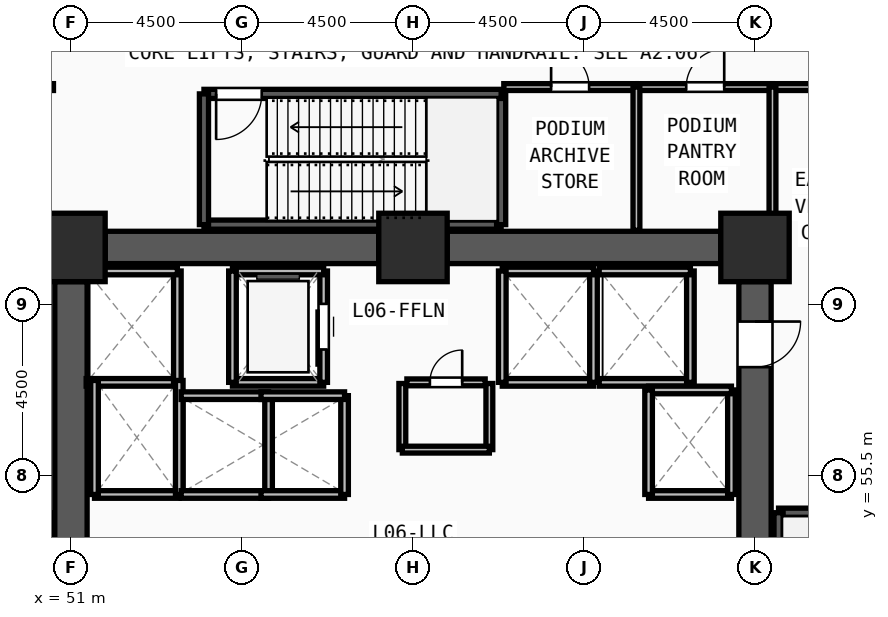
"""IFC4 building model, lengths in metres.
Left out: names, types, materials, properties, quantities, classifications, styles, units other than length and angle.
Written with IfcOpenShell. Run it as: python <this file> out.ifc"""

import sys

from ifc_helpers import new_model, si_unit, direction, frame, frame_2d, origin, origin_2d, place, context, subcontext, project, spatial, rectangle, extrude, source, transform, mapped, element, fill, save


model = new_model("IFC4")
c1 = context("Model", 3, precision=1e-05, world=origin(), true_north=direction((0.0, 1.0)))
c2 = subcontext(c1, "Body", "Model", "MODEL_VIEW")
j1 = project(units=[si_unit("LENGTHUNIT", "METRE"), si_unit("PLANEANGLEUNIT", "RADIAN")], contexts=[c1])
p1 = place(None, origin())
s1 = spatial("IfcSite", under=j1, at=p1, CompositionType="ELEMENT")
p2 = place(p1, origin())
s2 = spatial("IfcBuilding", under=s1, at=p2, CompositionType="ELEMENT")
p3 = place(p2, frame((0.0, 0.0, 23.4)))
s3 = spatial("IfcBuildingStorey", under=s2, at=p3, CompositionType="ELEMENT", Elevation=23.4)
m1 = source(origin(), c2, "Body", "SweptSolid", [
    extrude(rectangle(XDim=1.8, YDim=1.8, at=origin_2d()), origin(), (0.0, 0.0, 1.0), 5.1),
])
for number, where, z_axis, x_axis in (
    (1, (69.0, 61.5, 0.0), (0.0, 0.0, 1.0), (1.0, 0.0, 0.0)),
    (2, (60.0, 61.5, 0.0), (0.0, 0.0, 1.0), (1.0, 0.0, 0.0)),
    (3, (51.0, 61.5, 0.0), (0.0, 0.0, 1.0), (1.0, 0.0, 0.0)),
):
    element("IfcColumn", number, at=place(p3, frame(where, z_axis=z_axis, x_axis=x_axis)), inside=s3, PredefinedType="COLUMN", context=c2, shape_type="MappedRepresentation", body=[
        mapped(m1, transform((0.0, 0.0, 0.0), x_axis=(1.0, 0.0, 0.0), y_axis=(0.0, 1.0, 0.0), z_axis=(0.0, 0.0, 1.0), scale=1.0)),
    ])
for number, where, z_axis, x_axis in (
    (4, (51.9, 61.5, 0.0), (0.0, 0.0, 1.0), (1.0, 0.0, 0.0)),
    (5, (60.9, 61.5, 0.0), (0.0, 0.0, 1.0), (1.0, 0.0, 0.0)),
):
    element("IfcWall", number, at=place(p3, frame(where, z_axis=z_axis, x_axis=x_axis)), inside=s3, PredefinedType="SHEAR", context=c2, shape_type="SweptSolid", body=[
        extrude(rectangle(XDim=7.2, YDim=0.85, at=frame_2d((3.6, 0.0))), origin(), (0.0, 0.0, 1.0), 4.82),
    ])
p4 = place(p3, frame((69.0, 60.6, 0.0), z_axis=(0.0, 0.0, 1.0), x_axis=(0.0, -1.0, 0.0)))
e6 = element("IfcWall", 6, at=p4, inside=s3, PredefinedType="SHEAR", context=c2, shape_type="SweptSolid", body=[
    extrude(rectangle(XDim=13.2, YDim=0.85, at=frame_2d((6.6, 0.0))), origin(), (0.0, 0.0, 1.0), 4.82),
])
m2 = source(origin(), c2, "Body", "SweptSolid", [
    extrude(rectangle(XDim=1.2, YDim=2.2, at=frame_2d((0.6, 1.1))), frame((0.0, 0.435, 0.0), z_axis=(0.0, -1.0, 0.0), x_axis=(1.0, 0.0, 0.0)), (0.0, 0.0, 1.0), 0.87),
])
p5 = place(p4, frame((1.05, 0.0, 0.0)))
e7 = element("IfcOpeningElement", 7, at=p5, cuts=e6, PredefinedType="OPENING", context=c2, shape_type="MappedRepresentation", body=[
    mapped(m2, transform((0.0, 0.0, 0.0), x_axis=(1.0, 0.0, 0.0), y_axis=(0.0, 1.0, 0.0), z_axis=(0.0, 0.0, 1.0), scale=1.0)),
])
p6 = place(p3, frame((51.0, 47.4, 0.0), z_axis=(0.0, 0.0, 1.0), x_axis=(0.0, 1.0, 0.0)))
e8 = element("IfcWall", 8, at=p6, inside=s3, PredefinedType="SHEAR", context=c2, shape_type="SweptSolid", body=[
    extrude(rectangle(XDim=13.2, YDim=0.85, at=frame_2d((6.6, 0.0))), origin(), (0.0, 0.0, 1.0), 4.82),
])
p7 = place(p3, frame((73.06, 54.52, 0.0), z_axis=(0.0, 0.0, 1.0), x_axis=(-1.0, 0.0, 0.0)))
e9 = element("IfcWall", 9, at=p7, inside=s3, PredefinedType="SOLIDWALL", context=c2, shape_type="SweptSolid", body=[
    extrude(rectangle(XDim=3.44, YDim=0.24, at=frame_2d((1.72, 0.0))), origin(), (0.0, 0.0, 1.0), 4.82),
])
for number, where, z_axis, x_axis in (
    (10, (69.62, 54.52, 0.0), (0.0, 0.0, 1.0), (0.0, -1.0, 0.0)),
    (11, (54.5, 62.1, 0.0), (0.0, 0.0, 1.0), (1.0, 0.0, 0.0)),
):
    element("IfcWall", number, at=place(p3, frame(where, z_axis=z_axis, x_axis=x_axis)), inside=s3, PredefinedType="SOLIDWALL", context=c2, shape_type="SweptSolid", body=[
        extrude(rectangle(XDim=7.82, YDim=0.24, at=frame_2d((3.91, 0.0))), origin(), (0.0, 0.0, 1.0), 4.82),
    ])
p8 = place(p3, frame((62.32, 62.1, 0.0), z_axis=(0.0, 0.0, 1.0), x_axis=(0.0, 1.0, 0.0)))
e12 = element("IfcWall", 12, at=p8, inside=s3, PredefinedType="SOLIDWALL", context=c2, shape_type="SweptSolid", body=[
    extrude(rectangle(XDim=3.44, YDim=0.24, at=frame_2d((1.72, 0.0))), origin(), (0.0, 0.0, 1.0), 4.82),
])
p9 = place(p3, frame((62.32, 65.54, 0.0), z_axis=(0.0, 0.0, 1.0), x_axis=(-1.0, 0.0, 0.0)))
e13 = element("IfcWall", 13, at=p9, inside=s3, PredefinedType="SOLIDWALL", context=c2, shape_type="SweptSolid", body=[
    extrude(rectangle(XDim=7.82, YDim=0.24, at=frame_2d((3.91, 0.0))), origin(), (0.0, 0.0, 1.0), 4.82),
])
m3 = source(origin(), c2, "Body", "SweptSolid", [
    extrude(rectangle(XDim=1.2, YDim=2.2, at=frame_2d((0.6, 1.1))), frame((0.0, 0.13, 0.0), z_axis=(0.0, -1.0, 0.0), x_axis=(1.0, 0.0, 0.0)), (0.0, 0.0, 1.0), 0.26),
])
p10 = place(p9, frame((6.3, 0.0, 0.0)))
e14 = element("IfcOpeningElement", 14, at=p10, cuts=e13, PredefinedType="OPENING", context=c2, shape_type="MappedRepresentation", body=[
    mapped(m3, transform((0.0, 0.0, 0.0), x_axis=(1.0, 0.0, 0.0), y_axis=(0.0, 1.0, 0.0), z_axis=(0.0, 0.0, 1.0), scale=1.0)),
])
p11 = place(p3, frame((54.5, 65.54, 0.0), z_axis=(0.0, 0.0, 1.0), x_axis=(0.0, -1.0, 0.0)))
e15 = element("IfcWall", 15, at=p11, inside=s3, PredefinedType="SOLIDWALL", context=c2, shape_type="SweptSolid", body=[
    extrude(rectangle(XDim=3.44, YDim=0.24, at=frame_2d((1.72, 0.0))), origin(), (0.0, 0.0, 1.0), 4.82),
])
p12 = place(p3, frame((55.25, 57.95, 0.0), z_axis=(0.0, 0.0, 1.0), x_axis=(1.0, 0.0, 0.0)))
e16 = element("IfcWall", 16, at=p12, inside=s3, PredefinedType="SOLIDWALL", context=c2, shape_type="SweptSolid", body=[
    extrude(rectangle(XDim=2.4, YDim=0.2, at=frame_2d((1.2, 0.0))), origin(), (0.0, 0.0, 1.0), 4.82),
])
p13 = place(p3, frame((57.65, 57.95, 0.0), z_axis=(0.0, 0.0, 1.0), x_axis=(0.0, 1.0, 0.0)))
e17 = element("IfcWall", 17, at=p13, inside=s3, PredefinedType="SOLIDWALL", context=c2, shape_type="SweptSolid", body=[
    extrude(rectangle(XDim=2.93, YDim=0.2, at=frame_2d((1.465, 0.0))), origin(), (0.0, 0.0, 1.0), 4.82),
])
m4 = source(origin(), c2, "Body", "SweptSolid", [
    extrude(rectangle(XDim=1.2, YDim=2.3, at=frame_2d((0.6, 1.15))), frame((0.0, 0.11, 0.0), z_axis=(0.0, -1.0, 0.0), x_axis=(1.0, 0.0, 0.0)), (0.0, 0.0, 1.0), 0.22),
])
p14 = place(p13, frame((0.865, 0.0, 0.0)))
e18 = element("IfcOpeningElement", 18, at=p14, cuts=e17, PredefinedType="OPENING", context=c2, shape_type="MappedRepresentation", body=[
    mapped(m4, transform((0.0, 0.0, 0.0), x_axis=(1.0, 0.0, 0.0), y_axis=(0.0, 1.0, 0.0), z_axis=(0.0, 0.0, 1.0), scale=1.0)),
])
p15 = place(p3, frame((57.65, 60.88, 0.0), z_axis=(0.0, 0.0, 1.0), x_axis=(-1.0, 0.0, 0.0)))
e19 = element("IfcWall", 19, at=p15, inside=s3, PredefinedType="SOLIDWALL", context=c2, shape_type="SweptSolid", body=[
    extrude(rectangle(XDim=2.4, YDim=0.2, at=frame_2d((1.2, 0.0))), origin(), (0.0, 0.0, 1.0), 4.82),
])
p16 = place(p3, frame((55.25, 60.88, 0.0), z_axis=(0.0, 0.0, 1.0), x_axis=(0.0, -1.0, 0.0)))
e20 = element("IfcWall", 20, at=p16, inside=s3, PredefinedType="SOLIDWALL", context=c2, shape_type="SweptSolid", body=[
    extrude(rectangle(XDim=2.93, YDim=0.2, at=frame_2d((1.465, 0.0))), origin(), (0.0, 0.0, 1.0), 4.82),
])
p17 = place(p3, frame((62.35, 57.95, 0.0), z_axis=(0.0, 0.0, 1.0), x_axis=(1.0, 0.0, 0.0)))
e21 = element("IfcWall", 21, at=p17, inside=s3, PredefinedType="SOLIDWALL", context=c2, shape_type="SweptSolid", body=[
    extrude(rectangle(XDim=2.4, YDim=0.2, at=frame_2d((1.2, 0.0))), origin(), (0.0, 0.0, 1.0), 4.82),
])
p18 = place(p3, frame((64.75, 57.95, 0.0), z_axis=(0.0, 0.0, 1.0), x_axis=(0.0, 1.0, 0.0)))
e22 = element("IfcWall", 22, at=p18, inside=s3, PredefinedType="SOLIDWALL", context=c2, shape_type="SweptSolid", body=[
    extrude(rectangle(XDim=2.93, YDim=0.2, at=frame_2d((1.465, 0.0))), origin(), (0.0, 0.0, 1.0), 4.82),
])
p19 = place(p3, frame((64.75, 60.88, 0.0), z_axis=(0.0, 0.0, 1.0), x_axis=(-1.0, 0.0, 0.0)))
e23 = element("IfcWall", 23, at=p19, inside=s3, PredefinedType="SOLIDWALL", context=c2, shape_type="SweptSolid", body=[
    extrude(rectangle(XDim=2.4, YDim=0.2, at=frame_2d((1.2, 0.0))), origin(), (0.0, 0.0, 1.0), 4.82),
])
p20 = place(p3, frame((62.35, 60.88, 0.0), z_axis=(0.0, 0.0, 1.0), x_axis=(0.0, -1.0, 0.0)))
e24 = element("IfcWall", 24, at=p20, inside=s3, PredefinedType="SOLIDWALL", context=c2, shape_type="SweptSolid", body=[
    extrude(rectangle(XDim=2.93, YDim=0.2, at=frame_2d((1.465, 0.0))), origin(), (0.0, 0.0, 1.0), 4.82),
])
p21 = place(p3, frame((64.9, 57.95, 0.0), z_axis=(0.0, 0.0, 1.0), x_axis=(1.0, 0.0, 0.0)))
e25 = element("IfcWall", 25, at=p21, inside=s3, PredefinedType="SOLIDWALL", context=c2, shape_type="SweptSolid", body=[
    extrude(rectangle(XDim=2.4, YDim=0.2, at=frame_2d((1.2, 0.0))), origin(), (0.0, 0.0, 1.0), 4.82),
])
p22 = place(p3, frame((67.3, 57.95, 0.0), z_axis=(0.0, 0.0, 1.0), x_axis=(0.0, 1.0, 0.0)))
e26 = element("IfcWall", 26, at=p22, inside=s3, PredefinedType="SOLIDWALL", context=c2, shape_type="SweptSolid", body=[
    extrude(rectangle(XDim=2.93, YDim=0.2, at=frame_2d((1.465, 0.0))), origin(), (0.0, 0.0, 1.0), 4.82),
])
for number, where, z_axis, x_axis in (
    (27, (67.3, 60.88, 0.0), (0.0, 0.0, 1.0), (-1.0, 0.0, 0.0)),
    (28, (51.4, 57.95, 0.0), (0.0, 0.0, 1.0), (1.0, 0.0, 0.0)),
):
    element("IfcWall", number, at=place(p3, frame(where, z_axis=z_axis, x_axis=x_axis)), inside=s3, PredefinedType="SOLIDWALL", context=c2, shape_type="SweptSolid", body=[
        extrude(rectangle(XDim=2.4, YDim=0.2, at=frame_2d((1.2, 0.0))), origin(), (0.0, 0.0, 1.0), 4.82),
    ])
p23 = place(p3, frame((53.8, 57.95, 0.0), z_axis=(0.0, 0.0, 1.0), x_axis=(0.0, 1.0, 0.0)))
e29 = element("IfcWall", 29, at=p23, inside=s3, PredefinedType="SOLIDWALL", context=c2, shape_type="SweptSolid", body=[
    extrude(rectangle(XDim=2.93, YDim=0.2, at=frame_2d((1.465, 0.0))), origin(), (0.0, 0.0, 1.0), 4.82),
])
p24 = place(p3, frame((53.8, 60.88, 0.0), z_axis=(0.0, 0.0, 1.0), x_axis=(-1.0, 0.0, 0.0)))
e30 = element("IfcWall", 30, at=p24, inside=s3, PredefinedType="SOLIDWALL", context=c2, shape_type="SweptSolid", body=[
    extrude(rectangle(XDim=2.4, YDim=0.2, at=frame_2d((1.2, 0.0))), origin(), (0.0, 0.0, 1.0), 4.82),
])
p25 = place(p3, frame((51.62, 55.0, 0.0), z_axis=(0.0, 0.0, 1.0), x_axis=(1.0, 0.0, 0.0)))
e31 = element("IfcWall", 31, at=p25, inside=s3, PredefinedType="SOLIDWALL", context=c2, shape_type="SweptSolid", body=[
    extrude(rectangle(XDim=2.23, YDim=0.2, at=frame_2d((1.115, 0.0))), origin(), (0.0, 0.0, 1.0), 4.82),
])
for number, where, z_axis, x_axis in (
    (32, (53.85, 55.0, 0.0), (0.0, 0.0, 1.0), (0.0, 1.0, 0.0)),
    (33, (51.62, 58.0, 0.0), (0.0, 0.0, 1.0), (0.0, -1.0, 0.0)),
):
    element("IfcWall", number, at=place(p3, frame(where, z_axis=z_axis, x_axis=x_axis)), inside=s3, PredefinedType="SOLIDWALL", context=c2, shape_type="SweptSolid", body=[
        extrude(rectangle(XDim=3.0, YDim=0.2, at=frame_2d((1.5, 0.0))), origin(), (0.0, 0.0, 1.0), 4.82),
    ])
p26 = place(p3, frame((66.2, 55.0, 0.0), z_axis=(0.0, 0.0, 1.0), x_axis=(1.0, 0.0, 0.0)))
e34 = element("IfcWall", 34, at=p26, inside=s3, PredefinedType="SOLIDWALL", context=c2, shape_type="SweptSolid", body=[
    extrude(rectangle(XDim=2.18, YDim=0.2, at=frame_2d((1.09, 0.0))), origin(), (0.0, 0.0, 1.0), 4.82),
])
p27 = place(p3, frame((68.38, 55.0, 0.0), z_axis=(0.0, 0.0, 1.0), x_axis=(0.0, 1.0, 0.0)))
e35 = element("IfcWall", 35, at=p27, inside=s3, PredefinedType="SOLIDWALL", context=c2, shape_type="SweptSolid", body=[
    extrude(rectangle(XDim=2.75, YDim=0.2, at=frame_2d((1.375, 0.0))), origin(), (0.0, 0.0, 1.0), 4.82),
])
p28 = place(p3, frame((68.38, 57.75, 0.0), z_axis=(0.0, 0.0, 1.0), x_axis=(-1.0, 0.0, 0.0)))
e36 = element("IfcWall", 36, at=p28, inside=s3, PredefinedType="SOLIDWALL", context=c2, shape_type="SweptSolid", body=[
    extrude(rectangle(XDim=2.18, YDim=0.2, at=frame_2d((1.09, 0.0))), origin(), (0.0, 0.0, 1.0), 4.82),
])
p29 = place(p3, frame((66.2, 57.75, 0.0), z_axis=(0.0, 0.0, 1.0), x_axis=(0.0, -1.0, 0.0)))
e37 = element("IfcWall", 37, at=p29, inside=s3, PredefinedType="SOLIDWALL", context=c2, shape_type="SweptSolid", body=[
    extrude(rectangle(XDim=2.75, YDim=0.2, at=frame_2d((1.375, 0.0))), origin(), (0.0, 0.0, 1.0), 4.82),
])
p30 = place(p3, frame((53.9, 55.0, 0.0), z_axis=(0.0, 0.0, 1.0), x_axis=(1.0, 0.0, 0.0)))
e38 = element("IfcWall", 38, at=p30, inside=s3, PredefinedType="SOLIDWALL", context=c2, shape_type="SweptSolid", body=[
    extrude(rectangle(XDim=2.3, YDim=0.2, at=frame_2d((1.15, 0.0))), origin(), (0.0, 0.0, 1.0), 4.82),
])
p31 = place(p3, frame((56.2, 55.0, 0.0), z_axis=(0.0, 0.0, 1.0), x_axis=(0.0, 1.0, 0.0)))
e39 = element("IfcWall", 39, at=p31, inside=s3, PredefinedType="SOLIDWALL", context=c2, shape_type="SweptSolid", body=[
    extrude(rectangle(XDim=2.6, YDim=0.2, at=frame_2d((1.3, 0.0))), origin(), (0.0, 0.0, 1.0), 4.82),
])
p32 = place(p3, frame((56.2, 57.6, 0.0), z_axis=(0.0, 0.0, 1.0), x_axis=(-1.0, 0.0, 0.0)))
e40 = element("IfcWall", 40, at=p32, inside=s3, PredefinedType="SOLIDWALL", context=c2, shape_type="SweptSolid", body=[
    extrude(rectangle(XDim=2.3, YDim=0.2, at=frame_2d((1.15, 0.0))), origin(), (0.0, 0.0, 1.0), 4.82),
])
p33 = place(p3, frame((56.0, 55.0, 0.0), z_axis=(0.0, 0.0, 1.0), x_axis=(1.0, 0.0, 0.0)))
e41 = element("IfcWall", 41, at=p33, inside=s3, PredefinedType="SOLIDWALL", context=c2, shape_type="SweptSolid", body=[
    extrude(rectangle(XDim=2.2, YDim=0.2, at=frame_2d((1.1, 0.0))), origin(), (0.0, 0.0, 1.0), 4.82),
])
p34 = place(p3, frame((58.2, 55.0, 0.0), z_axis=(0.0, 0.0, 1.0), x_axis=(0.0, 1.0, 0.0)))
e42 = element("IfcWall", 42, at=p34, inside=s3, PredefinedType="SOLIDWALL", context=c2, shape_type="SweptSolid", body=[
    extrude(rectangle(XDim=2.6, YDim=0.2, at=frame_2d((1.3, 0.0))), origin(), (0.0, 0.0, 1.0), 4.82),
])
p35 = place(p3, frame((58.2, 57.6, 0.0), z_axis=(0.0, 0.0, 1.0), x_axis=(-1.0, 0.0, 0.0)))
e43 = element("IfcWall", 43, at=p35, inside=s3, PredefinedType="SOLIDWALL", context=c2, shape_type="SweptSolid", body=[
    extrude(rectangle(XDim=2.2, YDim=0.2, at=frame_2d((1.1, 0.0))), origin(), (0.0, 0.0, 1.0), 4.82),
])
p36 = place(p3, frame((59.84, 57.95, 0.0), z_axis=(0.0, 0.0, 1.0), x_axis=(1.0, 0.0, 0.0)))
e44 = element("IfcWall", 44, at=p36, inside=s3, PredefinedType="PARTITIONING", context=c2, shape_type="SweptSolid", body=[
    extrude(rectangle(XDim=2.06, YDim=0.18, at=frame_2d((1.03, 0.0))), origin(), (0.0, 0.0, 1.0), 4.82),
])
m5 = source(origin(), c2, "Body", "SweptSolid", [
    extrude(rectangle(XDim=0.85, YDim=2.1, at=frame_2d((0.425, 1.05))), frame((0.0, 0.1, 0.0), z_axis=(0.0, -1.0, 0.0), x_axis=(1.0, 0.0, 0.0)), (0.0, 0.0, 1.0), 0.2),
])
p37 = place(p36, frame((0.605, 0.0, 0.0)))
e45 = element("IfcOpeningElement", 45, at=p37, cuts=e44, PredefinedType="OPENING", context=c2, shape_type="MappedRepresentation", body=[
    mapped(m5, transform((0.0, 0.0, 0.0), x_axis=(1.0, 0.0, 0.0), y_axis=(0.0, 1.0, 0.0), z_axis=(0.0, 0.0, 1.0), scale=1.0)),
])
p38 = place(p3, frame((62.39, 65.72, 0.0), z_axis=(0.0, 0.0, 1.0), x_axis=(1.0, 0.0, 0.0)))
e46 = element("IfcWall", 46, at=p38, inside=s3, PredefinedType="PARTITIONING", context=c2, shape_type="SweptSolid", body=[
    extrude(rectangle(XDim=3.49, YDim=0.18, at=frame_2d((1.745, 0.0))), origin(), (0.0, 0.0, 1.0), 4.82),
])
m6 = source(origin(), c2, "Body", "SweptSolid", [
    extrude(rectangle(XDim=1.0, YDim=2.2, at=frame_2d((0.5, 1.1))), frame((0.0, 0.1, 0.0), z_axis=(0.0, -1.0, 0.0), x_axis=(1.0, 0.0, 0.0)), (0.0, 0.0, 1.0), 0.2),
])
p39 = place(p38, frame((1.245, 0.0, 0.0)))
e47 = element("IfcOpeningElement", 47, at=p39, cuts=e46, PredefinedType="OPENING", context=c2, shape_type="MappedRepresentation", body=[
    mapped(m6, transform((0.0, 0.0, 0.0), x_axis=(1.0, 0.0, 0.0), y_axis=(0.0, 1.0, 0.0), z_axis=(0.0, 0.0, 1.0), scale=1.0)),
])
p40 = place(p3, frame((65.92, 65.72, 0.0), z_axis=(0.0, 0.0, 1.0), x_axis=(1.0, 0.0, 0.0)))
e48 = element("IfcWall", 48, at=p40, inside=s3, PredefinedType="PARTITIONING", context=c2, shape_type="SweptSolid", body=[
    extrude(rectangle(XDim=3.54, YDim=0.18, at=frame_2d((1.77, 0.0))), origin(), (0.0, 0.0, 1.0), 4.82),
])
p41 = place(p40, frame((1.27, 0.0, 0.0)))
e49 = element("IfcOpeningElement", 49, at=p41, cuts=e48, PredefinedType="OPENING", context=c2, shape_type="MappedRepresentation", body=[
    mapped(m6, transform((0.0, 0.0, 0.0), x_axis=(1.0, 0.0, 0.0), y_axis=(0.0, 1.0, 0.0), z_axis=(0.0, 0.0, 1.0), scale=1.0)),
])
p42 = place(p3, frame((46.7, 65.72, 0.0), z_axis=(0.0, 0.0, 1.0), x_axis=(1.0, 0.0, 0.0)))
e50 = element("IfcWall", 50, at=p42, inside=s3, PredefinedType="PARTITIONING", context=c2, shape_type="SweptSolid", body=[
    extrude(rectangle(XDim=3.84, YDim=0.18, at=frame_2d((1.92, 0.0))), origin(), (0.0, 0.0, 1.0), 4.82),
])
m7 = source(origin(), c2, "Body", "SweptSolid", [
    extrude(rectangle(XDim=1.3, YDim=2.2, at=frame_2d((0.65, 1.1))), frame((0.0, 0.1, 0.0), z_axis=(0.0, -1.0, 0.0), x_axis=(1.0, 0.0, 0.0)), (0.0, 0.0, 1.0), 0.2),
])
p43 = place(p42, frame((1.27, 0.0, 0.0)))
e51 = element("IfcOpeningElement", 51, at=p43, cuts=e50, PredefinedType="OPENING", context=c2, shape_type="MappedRepresentation", body=[
    mapped(m7, transform((0.0, 0.0, 0.0), x_axis=(1.0, 0.0, 0.0), y_axis=(0.0, 1.0, 0.0), z_axis=(0.0, 0.0, 1.0), scale=1.0)),
])
p44 = place(p3, frame((69.46, 65.72, 0.0), z_axis=(0.0, 0.0, 1.0), x_axis=(1.0, 0.0, 0.0)))
e52 = element("IfcWall", 52, at=p44, inside=s3, PredefinedType="PARTITIONING", context=c2, shape_type="SweptSolid", body=[
    extrude(rectangle(XDim=3.84, YDim=0.18, at=frame_2d((1.92, 0.0))), origin(), (0.0, 0.0, 1.0), 4.82),
])
p45 = place(p44, frame((1.27, 0.0, 0.0)))
e53 = element("IfcOpeningElement", 53, at=p45, cuts=e52, PredefinedType="OPENING", context=c2, shape_type="MappedRepresentation", body=[
    mapped(m7, transform((0.0, 0.0, 0.0), x_axis=(1.0, 0.0, 0.0), y_axis=(0.0, 1.0, 0.0), z_axis=(0.0, 0.0, 1.0), scale=1.0)),
])
for number, where, z_axis, x_axis in (
    (54, (59.72, 56.18, 0.0), (0.0, 0.0, 1.0), (0.0, 1.0, 0.0)),
    (55, (62.01, 56.18, 0.0), (0.0, 0.0, 1.0), (0.0, 1.0, 0.0)),
):
    element("IfcWall", number, at=place(p3, frame(where, z_axis=z_axis, x_axis=x_axis)), inside=s3, PredefinedType="PARTITIONING", context=c2, shape_type="SweptSolid", body=[
        extrude(rectangle(XDim=1.74, YDim=0.18, at=frame_2d((0.87, 0.0))), origin(), (0.0, 0.0, 1.0), 4.82),
    ])
p46 = place(p3, frame((59.72, 56.18, 0.0), z_axis=(0.0, 0.0, 1.0), x_axis=(1.0, 0.0, 0.0)))
e56 = element("IfcWall", 56, at=p46, inside=s3, PredefinedType="PARTITIONING", context=c2, shape_type="SweptSolid", body=[
    extrude(rectangle(XDim=2.29, YDim=0.18, at=frame_2d((1.145, 0.0))), origin(), (0.0, 0.0, 1.0), 4.82),
])
p47 = place(p3, frame((65.88, 61.95, 0.0), z_axis=(0.0, 0.0, 1.0), x_axis=(0.0, 1.0, 0.0)))
e57 = element("IfcWall", 57, at=p47, inside=s3, PredefinedType="PARTITIONING", context=c2, shape_type="SweptSolid", body=[
    extrude(rectangle(XDim=3.77, YDim=0.18, at=frame_2d((1.885, 0.0))), origin(), (0.0, 0.0, 1.0), 4.82),
])
p48 = place(p3, frame((69.46, 61.95, 0.0), z_axis=(0.0, 0.0, 1.0), x_axis=(0.0, 1.0, 0.0)))
e58 = element("IfcWall", 58, at=p48, inside=s3, PredefinedType="PARTITIONING", context=c2, shape_type="SweptSolid", body=[
    extrude(rectangle(XDim=3.77, YDim=0.18, at=frame_2d((1.885, 0.0))), origin(), (0.0, 0.0, 1.0), 3.335),
])
m8 = source(origin(), c2, "Body", "SweptSolid", [
    extrude(rectangle(XDim=1.2, YDim=2.2, at=frame_2d((0.6, 1.1))), frame((0.0, 0.025, 0.0), z_axis=(0.0, -1.0, 0.0), x_axis=(1.0, 0.0, 0.0)), (0.0, 0.0, 1.0), 0.05),
])
p49 = place(p5, origin())
e59 = element("IfcDoor", 59, at=p49, inside=s3, OperationType="SINGLE_SWING_LEFT", PredefinedType="DOOR", context=c2, shape_type="MappedRepresentation", body=[
    mapped(m8, transform((0.0, 0.0, 0.0), x_axis=(1.0, 0.0, 0.0), y_axis=(0.0, 1.0, 0.0), z_axis=(0.0, 0.0, 1.0), scale=1.0)),
])
fill(e7, e59)
p50 = place(p10, origin())
e60 = element("IfcDoor", 60, at=p50, inside=s3, OperationType="SINGLE_SWING_RIGHT", PredefinedType="DOOR", context=c2, shape_type="MappedRepresentation", body=[
    mapped(m8, transform((0.0, 0.0, 0.0), x_axis=(1.0, 0.0, 0.0), y_axis=(0.0, 1.0, 0.0), z_axis=(0.0, 0.0, 1.0), scale=1.0)),
])
fill(e14, e60)
m9 = source(origin(), c2, "Body", "SweptSolid", [
    extrude(rectangle(XDim=1.2, YDim=2.3, at=frame_2d((0.6, 1.15))), frame((0.0, 0.025, 0.0), z_axis=(0.0, -1.0, 0.0), x_axis=(1.0, 0.0, 0.0)), (0.0, 0.0, 1.0), 0.05),
])
p51 = place(p14, origin())
e61 = element("IfcDoor", 61, at=p51, inside=s3, OperationType="SLIDING_TO_LEFT", PredefinedType="DOOR", context=c2, shape_type="MappedRepresentation", body=[
    mapped(m9, transform((0.0, 0.0, 0.0), x_axis=(1.0, 0.0, 0.0), y_axis=(0.0, 1.0, 0.0), z_axis=(0.0, 0.0, 1.0), scale=1.0)),
])
fill(e18, e61)
m10 = source(origin(), c2, "Body", "SweptSolid", [
    extrude(rectangle(XDim=0.85, YDim=2.1, at=frame_2d((0.425, 1.05))), frame((0.0, 0.025, 0.0), z_axis=(0.0, -1.0, 0.0), x_axis=(1.0, 0.0, 0.0)), (0.0, 0.0, 1.0), 0.05),
])
p52 = place(p37, origin())
e62 = element("IfcDoor", 62, at=p52, inside=s3, OperationType="SINGLE_SWING_RIGHT", PredefinedType="DOOR", context=c2, shape_type="MappedRepresentation", body=[
    mapped(m10, transform((0.0, 0.0, 0.0), x_axis=(1.0, 0.0, 0.0), y_axis=(0.0, 1.0, 0.0), z_axis=(0.0, 0.0, 1.0), scale=1.0)),
])
fill(e45, e62)
m11 = source(origin(), c2, "Body", "SweptSolid", [
    extrude(rectangle(XDim=1.0, YDim=2.2, at=frame_2d((0.5, 1.1))), frame((0.0, 0.025, 0.0), z_axis=(0.0, -1.0, 0.0), x_axis=(1.0, 0.0, 0.0)), (0.0, 0.0, 1.0), 0.05),
])
p53 = place(p39, origin())
e63 = element("IfcDoor", 63, at=p53, inside=s3, OperationType="SINGLE_SWING_LEFT", PredefinedType="DOOR", context=c2, shape_type="MappedRepresentation", body=[
    mapped(m11, transform((0.0, 0.0, 0.0), x_axis=(1.0, 0.0, 0.0), y_axis=(0.0, 1.0, 0.0), z_axis=(0.0, 0.0, 1.0), scale=1.0)),
])
fill(e47, e63)
p54 = place(p41, origin())
e64 = element("IfcDoor", 64, at=p54, inside=s3, OperationType="SINGLE_SWING_RIGHT", PredefinedType="DOOR", context=c2, shape_type="MappedRepresentation", body=[
    mapped(m11, transform((0.0, 0.0, 0.0), x_axis=(1.0, 0.0, 0.0), y_axis=(0.0, 1.0, 0.0), z_axis=(0.0, 0.0, 1.0), scale=1.0)),
])
fill(e49, e64)
save(model, sys.argv[1])
